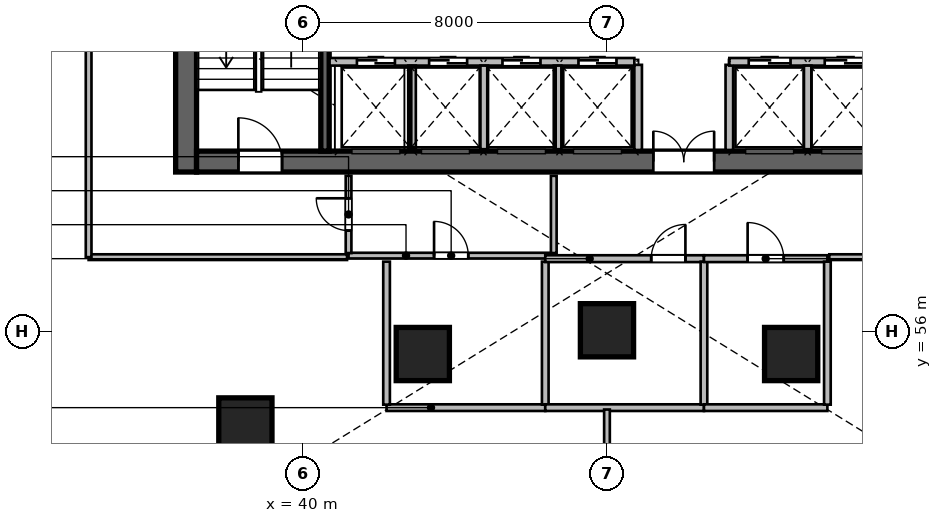
"""IFC4 building model, lengths in metres.
Left out: names, types, materials, properties, quantities, classifications, styles, units other than length and angle.
Written with IfcOpenShell. Run it as: python <this file> out.ifc"""

import sys

from ifc_helpers import new_model, si_unit, direction, frame, frame_2d, origin, origin_2d, place, context, subcontext, project, spatial, rectangle, circle, extrude, source, transform, mapped, element, fill, save


model = new_model("IFC4")
c1 = context("Model", 3, precision=1e-05, world=origin(), true_north=direction((0.0, 1.0)))
c2 = subcontext(c1, "Body", "Model", "MODEL_VIEW")
j1 = project(units=[si_unit("LENGTHUNIT", "METRE"), si_unit("PLANEANGLEUNIT", "RADIAN")], contexts=[c1])
p1 = place(None, origin())
s1 = spatial("IfcSite", under=j1, at=p1, CompositionType="ELEMENT")
p2 = place(p1, origin())
s2 = spatial("IfcBuilding", under=s1, at=p2, CompositionType="ELEMENT")
p3 = place(p2, frame((0.0, 0.0, 30.0)))
s3 = spatial("IfcBuildingStorey", under=s2, at=p3, CompositionType="ELEMENT", Elevation=30.0)
m1 = source(origin(), c2, "Body", "SweptSolid", [
    extrude(rectangle(XDim=12.0, YDim=0.55, at=frame_2d((6.0, 0.0))), origin(), (0.0, 0.0, 1.0), 5.4),
])
p4 = place(p3, frame((36.925, 60.2, 0.0), z_axis=(0.0, 0.0, 1.0), x_axis=(0.0, 1.0, 0.0)))
e1 = element("IfcWall", 1, at=p4, inside=s3, PredefinedType="SHEAR", context=c2, shape_type="MappedRepresentation", body=[
    mapped(m1, transform((0.0, 0.0, 0.0), scale=1.0)),
])
m2 = source(origin(), c2, "Body", "SweptSolid", [
    extrude(rectangle(XDim=21.6, YDim=0.55, at=frame_2d((10.8, 0.0))), origin(), (0.0, 0.0, 1.0), 5.4),
])
p5 = place(p3, frame((37.2, 60.475, 0.0), z_axis=(0.0, 0.0, 1.0), x_axis=(1.0, 0.0, 0.0)))
e2 = element("IfcWall", 2, at=p5, inside=s3, PredefinedType="SHEAR", context=c2, shape_type="MappedRepresentation", body=[
    mapped(m2, transform((0.0, 0.0, 0.0), scale=1.0)),
])
p6 = place(p5, frame((1.1, 0.0, 0.0)))
e3 = element("IfcOpeningElement", 3, at=p6, cuts=e2, PredefinedType="OPENING", context=c2, shape_type="SweptSolid", body=[
    extrude(rectangle(XDim=1.15, YDim=2.15, at=frame_2d((0.575, 1.075))), frame((0.0, 0.285, 0.0), z_axis=(0.0, -1.0, 0.0), x_axis=(1.0, 0.0, 0.0)), (0.0, 0.0, 1.0), 0.57),
])
p7 = place(p5, frame((19.5, 0.0, 0.0)))
e4 = element("IfcOpeningElement", 4, at=p7, cuts=e2, PredefinedType="OPENING", context=c2, shape_type="SweptSolid", body=[
    extrude(rectangle(XDim=0.9, YDim=2.1, at=frame_2d((0.45, 1.05))), frame((0.0, 0.285, 0.0), z_axis=(0.0, -1.0, 0.0), x_axis=(1.0, 0.0, 0.0)), (0.0, 0.0, 1.0), 0.57),
])
p8 = place(p5, frame((12.02, 0.0, 0.0)))
e5 = element("IfcOpeningElement", 5, at=p8, cuts=e2, PredefinedType="OPENING", context=c2, shape_type="SweptSolid", body=[
    extrude(rectangle(XDim=1.6, YDim=2.15, at=frame_2d((0.8, 1.075))), frame((0.0, 0.285, 0.0), z_axis=(0.0, -1.0, 0.0), x_axis=(1.0, 0.0, 0.0)), (0.0, 0.0, 1.0), 0.57),
])
m3 = source(origin(), c2, "Body", "SweptSolid", [
    extrude(rectangle(XDim=10.9, YDim=0.22, at=frame_2d((5.45, 0.0))), origin(), (0.0, 0.0, 1.0), 5.4),
])
p9 = place(p3, frame((40.58, 60.75, 0.0), z_axis=(0.0, 0.0, 1.0), x_axis=(0.0, 1.0, 0.0)))
e6 = element("IfcWall", 6, at=p9, inside=s3, PredefinedType="SHEAR", context=c2, shape_type="MappedRepresentation", body=[
    mapped(m3, transform((0.0, 0.0, 0.0), scale=1.0)),
])
m4 = source(origin(), c2, "Body", "SweptSolid", [
    extrude(circle(Radius=0.7, at=origin_2d()), origin(), (0.0, 0.0, 1.0), 5.4),
])
for number, where, z_axis, x_axis in (
    (7, (38.485, 53.558, 0.0), (0.0, 0.0, 1.0), (-0.289, 0.957, 0.0)),
    (8, (43.154, 55.411, 0.0), (0.0, 0.0, 1.0), (-0.143, 0.99, 0.0)),
    (9, (48.0, 56.036, 0.0), (0.0, 0.0, 1.0), (0.0, 1.0, 0.0)),
    (10, (52.846, 55.411, 0.0), (0.0, 0.0, 1.0), (0.143, 0.99, 0.0)),
):
    element("IfcColumn", number, at=place(p3, frame(where, z_axis=z_axis, x_axis=x_axis)), inside=s3, PredefinedType="COLUMN", context=c2, shape_type="MappedRepresentation", body=[
        mapped(m4, transform((0.0, 0.0, 0.0), scale=1.0)),
    ])
m5 = source(origin(), c2, "Body", "SweptSolid", [
    extrude(rectangle(XDim=2.24, YDim=0.2, at=frame_2d((1.12, 0.0))), origin(), (0.0, 0.0, 1.0), 5.16),
])
for number, where, z_axis, x_axis in (
    (11, (48.82, 60.78, 0.0), (0.0, 0.0, 1.0), (0.0, 1.0, 0.0)),
    (12, (51.22, 60.78, 0.0), (0.0, 0.0, 1.0), (0.0, 1.0, 0.0)),
):
    element("IfcWall", number, at=place(p3, frame(where, z_axis=z_axis, x_axis=x_axis)), inside=s3, PredefinedType="SOLIDWALL", context=c2, shape_type="MappedRepresentation", body=[
        mapped(m5, transform((0.0, 0.0, 0.0), scale=1.0)),
    ])
m6 = source(origin(), c2, "Body", "SweptSolid", [
    extrude(rectangle(XDim=8.02, YDim=0.2, at=frame_2d((4.01, 0.0))), origin(), (0.0, 0.0, 1.0), 5.16),
])
p10 = place(p3, frame((40.7, 63.1, 0.0), z_axis=(0.0, 0.0, 1.0), x_axis=(1.0, 0.0, 0.0)))
e13 = element("IfcWall", 13, at=p10, inside=s3, PredefinedType="SOLIDWALL", context=c2, shape_type="MappedRepresentation", body=[
    mapped(m6, transform((0.0, 0.0, 0.0), scale=1.0)),
])
p11 = place(p10, frame((0.72, 0.0, 0.0)))
e14 = element("IfcOpeningElement", 14, at=p11, cuts=e13, PredefinedType="OPENING", context=c2, shape_type="SweptSolid", body=[
    extrude(rectangle(XDim=1.0, YDim=2.15, at=frame_2d((0.5, 1.075))), frame((0.0, 0.11, 0.0), z_axis=(0.0, -1.0, 0.0), x_axis=(1.0, 0.0, 0.0)), (0.0, 0.0, 1.0), 0.22),
])
p12 = place(p10, frame((2.62, 0.0, 0.0)))
e15 = element("IfcOpeningElement", 15, at=p12, cuts=e13, PredefinedType="OPENING", context=c2, shape_type="SweptSolid", body=[
    extrude(rectangle(XDim=1.0, YDim=2.15, at=frame_2d((0.5, 1.075))), frame((0.0, 0.11, 0.0), z_axis=(0.0, -1.0, 0.0), x_axis=(1.0, 0.0, 0.0)), (0.0, 0.0, 1.0), 0.22),
])
p13 = place(p10, frame((4.55, 0.0, 0.0)))
e16 = element("IfcOpeningElement", 16, at=p13, cuts=e13, PredefinedType="OPENING", context=c2, shape_type="SweptSolid", body=[
    extrude(rectangle(XDim=1.0, YDim=2.15, at=frame_2d((0.5, 1.075))), frame((0.0, 0.11, 0.0), z_axis=(0.0, -1.0, 0.0), x_axis=(1.0, 0.0, 0.0)), (0.0, 0.0, 1.0), 0.22),
])
p14 = place(p10, frame((6.55, 0.0, 0.0)))
e17 = element("IfcOpeningElement", 17, at=p14, cuts=e13, PredefinedType="OPENING", context=c2, shape_type="SweptSolid", body=[
    extrude(rectangle(XDim=1.0, YDim=2.15, at=frame_2d((0.5, 1.075))), frame((0.0, 0.11, 0.0), z_axis=(0.0, -1.0, 0.0), x_axis=(1.0, 0.0, 0.0)), (0.0, 0.0, 1.0), 0.22),
])
m7 = source(origin(), c2, "Body", "SweptSolid", [
    extrude(rectangle(XDim=4.1, YDim=0.2, at=frame_2d((2.05, 0.0))), origin(), (0.0, 0.0, 1.0), 5.16),
])
p15 = place(p3, frame((51.22, 63.1, 0.0), z_axis=(0.0, 0.0, 1.0), x_axis=(1.0, 0.0, 0.0)))
e18 = element("IfcWall", 18, at=p15, inside=s3, PredefinedType="SOLIDWALL", context=c2, shape_type="MappedRepresentation", body=[
    mapped(m7, transform((0.0, 0.0, 0.0), scale=1.0)),
])
p16 = place(p15, frame((0.51, 0.0, 0.0)))
e19 = element("IfcOpeningElement", 19, at=p16, cuts=e18, PredefinedType="OPENING", context=c2, shape_type="SweptSolid", body=[
    extrude(rectangle(XDim=1.1, YDim=2.15, at=frame_2d((0.55, 1.075))), frame((0.0, 0.11, 0.0), z_axis=(0.0, -1.0, 0.0), x_axis=(1.0, 0.0, 0.0)), (0.0, 0.0, 1.0), 0.22),
])
p17 = place(p15, frame((2.51, 0.0, 0.0)))
e20 = element("IfcOpeningElement", 20, at=p17, cuts=e18, PredefinedType="OPENING", context=c2, shape_type="SweptSolid", body=[
    extrude(rectangle(XDim=1.1, YDim=2.15, at=frame_2d((0.55, 1.075))), frame((0.0, 0.11, 0.0), z_axis=(0.0, -1.0, 0.0), x_axis=(1.0, 0.0, 0.0)), (0.0, 0.0, 1.0), 0.22),
])
m8 = source(origin(), c2, "Body", "SweptSolid", [
    extrude(rectangle(XDim=2.2, YDim=0.2, at=frame_2d((1.1, 0.0))), origin(), (0.0, 0.0, 1.0), 5.16),
])
for number, where, z_axis, x_axis in (
    (21, (42.87, 60.8, 0.0), (0.0, 0.0, 1.0), (0.0, 1.0, 0.0)),
    (22, (44.77, 60.8, 0.0), (0.0, 0.0, 1.0), (0.0, 1.0, 0.0)),
    (23, (46.7, 60.8, 0.0), (0.0, 0.0, 1.0), (0.0, 1.0, 0.0)),
    (24, (53.28, 60.8, 0.0), (0.0, 0.0, 1.0), (0.0, 1.0, 0.0)),
):
    element("IfcWall", number, at=place(p3, frame(where, z_axis=z_axis, x_axis=x_axis)), inside=s3, PredefinedType="SOLIDWALL", context=c2, shape_type="MappedRepresentation", body=[
        mapped(m8, transform((0.0, 0.0, 0.0), scale=1.0)),
    ])
m9 = source(origin(), c2, "Body", "SweptSolid", [
    extrude(rectangle(XDim=5.4, YDim=0.15, at=frame_2d((2.7, 0.0))), origin(), (0.0, 0.0, 1.0), 4.591),
])
p18 = place(p3, frame((41.2, 58.0, 0.0), z_axis=(0.0, 0.0, 1.0), x_axis=(1.0, 0.0, 0.0)))
e25 = element("IfcWall", 25, at=p18, inside=s3, PredefinedType="PARTITIONING", context=c2, shape_type="MappedRepresentation", body=[
    mapped(m9, transform((0.0, 0.0, 0.0), scale=1.0)),
])
p19 = place(p18, frame((2.25, 0.0, 0.0)))
e26 = element("IfcOpeningElement", 26, at=p19, cuts=e25, PredefinedType="OPENING", context=c2, shape_type="SweptSolid", body=[
    extrude(rectangle(XDim=0.9, YDim=2.08, at=frame_2d((0.45, 1.04))), frame((0.0, 0.085, 0.0), z_axis=(0.0, -1.0, 0.0), x_axis=(1.0, 0.0, 0.0)), (0.0, 0.0, 1.0), 0.17),
])
m10 = source(origin(), c2, "Body", "SweptSolid", [
    extrude(rectangle(XDim=2.033, YDim=0.15, at=frame_2d((1.016, 0.0))), origin(), (0.0, 0.0, 1.0), 5.16),
])
p20 = place(p3, frame((41.2, 58.067, 0.0), z_axis=(0.0, 0.0, 1.0), x_axis=(0.0, 1.0, 0.0)))
e27 = element("IfcWall", 27, at=p20, inside=s3, PredefinedType="PARTITIONING", context=c2, shape_type="MappedRepresentation", body=[
    mapped(m10, transform((0.0, 0.0, 0.0), scale=1.0)),
])
p21 = place(p20, frame((0.591, 0.0, 0.0)))
e28 = element("IfcOpeningElement", 28, at=p21, cuts=e27, PredefinedType="OPENING", context=c2, shape_type="SweptSolid", body=[
    extrude(rectangle(XDim=0.85, YDim=2.1, at=frame_2d((0.425, 1.05))), frame((0.0, 0.085, 0.0), z_axis=(0.0, -1.0, 0.0), x_axis=(1.0, 0.0, 0.0)), (0.0, 0.0, 1.0), 0.17),
])
p22 = place(p3, frame((46.6, 58.067, 0.0), z_axis=(0.0, 0.0, 1.0), x_axis=(0.0, 1.0, 0.0)))
e29 = element("IfcWall", 29, at=p22, inside=s3, PredefinedType="PARTITIONING", context=c2, shape_type="MappedRepresentation", body=[
    mapped(m10, transform((0.0, 0.0, 0.0), scale=1.0)),
])
m11 = source(origin(), c2, "Body", "SweptSolid", [
    extrude(rectangle(XDim=4.176, YDim=0.175, at=frame_2d((2.088, 0.0))), origin(), (0.0, 0.0, 1.0), 5.16),
])
p23 = place(p3, frame((42.2, 54.0, 0.0), z_axis=(0.0, 0.0, 1.0), x_axis=(1.0, 0.0, 0.0)))
e30 = element("IfcWall", 30, at=p23, inside=s3, PredefinedType="PARTITIONING", context=c2, shape_type="MappedRepresentation", body=[
    mapped(m11, transform((0.0, 0.0, 0.0), scale=1.0)),
])
m12 = source(origin(), c2, "Body", "SweptSolid", [
    extrude(rectangle(XDim=3.763, YDim=0.175, at=frame_2d((1.881, 0.0))), origin(), (0.0, 0.0, 1.0), 5.16),
])
for number, where, z_axis, x_axis in (
    (31, (42.2, 54.079, 0.0), (0.0, 0.0, 1.0), (0.0, 1.0, 0.0)),
    (32, (46.376, 54.079, 0.0), (0.0, 0.0, 1.0), (0.0, 1.0, 0.0)),
):
    element("IfcWall", number, at=place(p3, frame(where, z_axis=z_axis, x_axis=x_axis)), inside=s3, PredefinedType="PARTITIONING", context=c2, shape_type="MappedRepresentation", body=[
        mapped(m12, transform((0.0, 0.0, 0.0), scale=1.0)),
    ])
p24 = place(p3, frame((46.376, 54.0, 0.0), z_axis=(0.0, 0.0, 1.0), x_axis=(1.0, 0.0, 0.0)))
e33 = element("IfcWall", 33, at=p24, inside=s3, PredefinedType="PARTITIONING", context=c2, shape_type="MappedRepresentation", body=[
    mapped(m11, transform((0.0, 0.0, 0.0), scale=1.0)),
])
m13 = source(origin(), c2, "Body", "SweptSolid", [
    extrude(rectangle(XDim=4.176, YDim=0.18, at=frame_2d((2.088, 0.0))), origin(), (0.0, 0.0, 1.0), 5.16),
])
p25 = place(p3, frame((46.376, 57.92, 0.0), z_axis=(0.0, 0.0, 1.0), x_axis=(1.0, 0.0, 0.0)))
e34 = element("IfcWall", 34, at=p25, inside=s3, PredefinedType="PLUMBINGWALL", context=c2, shape_type="MappedRepresentation", body=[
    mapped(m13, transform((0.0, 0.0, 0.0), scale=1.0)),
])
p26 = place(p25, frame((2.788, 0.0, 0.0)))
e35 = element("IfcOpeningElement", 35, at=p26, cuts=e34, PredefinedType="OPENING", context=c2, shape_type="SweptSolid", body=[
    extrude(rectangle(XDim=0.9, YDim=2.08, at=frame_2d((0.45, 1.04))), frame((0.0, 0.1, 0.0), z_axis=(0.0, -1.0, 0.0), x_axis=(1.0, 0.0, 0.0)), (0.0, 0.0, 1.0), 0.2),
])
p27 = place(p3, frame((50.552, 54.079, 0.0), z_axis=(0.0, 0.0, 1.0), x_axis=(0.0, 1.0, 0.0)))
e36 = element("IfcWall", 36, at=p27, inside=s3, PredefinedType="PARTITIONING", context=c2, shape_type="MappedRepresentation", body=[
    mapped(m12, transform((0.0, 0.0, 0.0), scale=1.0)),
])
m14 = source(origin(), c2, "Body", "SweptSolid", [
    extrude(rectangle(XDim=3.248, YDim=0.175, at=frame_2d((1.624, 0.0))), origin(), (0.0, 0.0, 1.0), 5.16),
])
p28 = place(p3, frame((50.552, 54.0, 0.0), z_axis=(0.0, 0.0, 1.0), x_axis=(1.0, 0.0, 0.0)))
e37 = element("IfcWall", 37, at=p28, inside=s3, PredefinedType="PARTITIONING", context=c2, shape_type="MappedRepresentation", body=[
    mapped(m14, transform((0.0, 0.0, 0.0), scale=1.0)),
])
m15 = source(origin(), c2, "Body", "SweptSolid", [
    extrude(rectangle(XDim=3.248, YDim=0.18, at=frame_2d((1.624, 0.0))), origin(), (0.0, 0.0, 1.0), 5.16),
])
p29 = place(p3, frame((50.552, 57.92, 0.0), z_axis=(0.0, 0.0, 1.0), x_axis=(1.0, 0.0, 0.0)))
e38 = element("IfcWall", 38, at=p29, inside=s3, PredefinedType="PLUMBINGWALL", context=c2, shape_type="MappedRepresentation", body=[
    mapped(m15, transform((0.0, 0.0, 0.0), scale=1.0)),
])
p30 = place(p29, frame((1.149, 0.0, 0.0)))
e39 = element("IfcOpeningElement", 39, at=p30, cuts=e38, PredefinedType="OPENING", context=c2, shape_type="SweptSolid", body=[
    extrude(rectangle(XDim=0.95, YDim=2.12, at=frame_2d((0.475, 1.06))), frame((0.0, 0.1, 0.0), z_axis=(0.0, -1.0, 0.0), x_axis=(1.0, 0.0, 0.0)), (0.0, 0.0, 1.0), 0.2),
])
p31 = place(p3, frame((53.8, 54.079, 0.0), z_axis=(0.0, 0.0, 1.0), x_axis=(0.0, 1.0, 0.0)))
e40 = element("IfcWall", 40, at=p31, inside=s3, PredefinedType="PARTITIONING", context=c2, shape_type="MappedRepresentation", body=[
    mapped(m12, transform((0.0, 0.0, 0.0), scale=1.0)),
])
m16 = source(origin(), c2, "Body", "SweptSolid", [
    extrude(rectangle(XDim=2.146, YDim=0.15, at=frame_2d((1.073, 0.0))), origin(), (0.0, 0.0, 1.0), 5.16),
])
p32 = place(p3, frame((48.0, 51.804, 0.0), z_axis=(0.0, 0.0, 1.0), x_axis=(0.0, 1.0, 0.0)))
e41 = element("IfcWall", 41, at=p32, inside=s3, PredefinedType="PARTITIONING", context=c2, shape_type="MappedRepresentation", body=[
    mapped(m16, transform((0.0, 0.0, 0.0), scale=1.0)),
])
m17 = source(origin(), c2, "Body", "SweptSolid", [
    extrude(rectangle(XDim=6.8, YDim=0.15, at=frame_2d((3.4, 0.0))), origin(), (0.0, 0.0, 1.0), 5.16),
])
p33 = place(p3, frame((34.36, 57.96, 0.0), z_axis=(0.0, 0.0, 1.0), x_axis=(1.0, 0.0, 0.0)))
e42 = element("IfcWall", 42, at=p33, inside=s3, PredefinedType="PARTITIONING", context=c2, shape_type="MappedRepresentation", body=[
    mapped(m17, transform((0.0, 0.0, 0.0), scale=1.0)),
])
m18 = source(origin(), c2, "Body", "SweptSolid", [
    extrude(rectangle(XDim=19.708, YDim=0.15, at=frame_2d((9.854, 0.0))), origin(), (0.0, 0.0, 1.0), 5.16),
])
p34 = place(p3, frame((34.36, 57.96, 0.0), z_axis=(0.0, 0.0, 1.0), x_axis=(0.0, 1.0, 0.0)))
e43 = element("IfcWall", 43, at=p34, inside=s3, PredefinedType="PARTITIONING", context=c2, shape_type="MappedRepresentation", body=[
    mapped(m18, transform((0.0, 0.0, 0.0), scale=1.0)),
])
p35 = place(p34, frame((9.154, 0.0, 0.0)))
e44 = element("IfcOpeningElement", 44, at=p35, cuts=e43, PredefinedType="OPENING", context=c2, shape_type="SweptSolid", body=[
    extrude(rectangle(XDim=1.4, YDim=2.15, at=frame_2d((0.7, 1.075))), frame((0.0, 0.085, 0.0), z_axis=(0.0, -1.0, 0.0), x_axis=(1.0, 0.0, 0.0)), (0.0, 0.0, 1.0), 0.17),
])
m19 = source(origin(), c2, "Body", "SweptSolid", [
    extrude(rectangle(XDim=7.79, YDim=0.15, at=frame_2d((3.895, 0.0))), origin(), (0.0, 0.0, 1.0), 4.591),
])
p36 = place(p3, frame((53.85, 57.96, 0.0), z_axis=(0.0, 0.0, 1.0), x_axis=(1.0, 0.0, 0.0)))
e45 = element("IfcWall", 45, at=p36, inside=s3, PredefinedType="PARTITIONING", context=c2, shape_type="MappedRepresentation", body=[
    mapped(m19, transform((0.0, 0.0, 0.0), scale=1.0)),
])
p37 = place(p36, frame((3.195, 0.0, 0.0)))
e46 = element("IfcOpeningElement", 46, at=p37, cuts=e45, PredefinedType="OPENING", context=c2, shape_type="SweptSolid", body=[
    extrude(rectangle(XDim=1.4, YDim=2.15, at=frame_2d((0.7, 1.075))), frame((0.0, 0.085, 0.0), z_axis=(0.0, -1.0, 0.0), x_axis=(1.0, 0.0, 0.0)), (0.0, 0.0, 1.0), 0.17),
])
m20 = source(origin(), c2, "Body", "SweptSolid", [
    extrude(rectangle(XDim=1.15, YDim=2.15, at=frame_2d((0.575, 1.075))), frame((0.0, 0.025, 0.0), z_axis=(0.0, -1.0, 0.0), x_axis=(1.0, 0.0, 0.0)), (0.0, 0.0, 1.0), 0.05),
])
p38 = place(p6, origin())
e47 = element("IfcDoor", 47, at=p38, inside=s3, OperationType="SINGLE_SWING_LEFT", PredefinedType="DOOR", context=c2, shape_type="MappedRepresentation", body=[
    mapped(m20, transform((0.0, 0.0, 0.0), scale=1.0)),
])
fill(e3, e47)
m21 = source(origin(), c2, "Body", "SweptSolid", [
    extrude(rectangle(XDim=1.6, YDim=2.15, at=frame_2d((0.8, 1.075))), frame((0.0, 0.025, 0.0), z_axis=(0.0, -1.0, 0.0), x_axis=(1.0, 0.0, 0.0)), (0.0, 0.0, 1.0), 0.05),
])
p39 = place(p8, origin())
e48 = element("IfcDoor", 48, at=p39, inside=s3, OperationType="DOUBLE_DOOR_SINGLE_SWING", PredefinedType="DOOR", context=c2, shape_type="MappedRepresentation", body=[
    mapped(m21, transform((0.0, 0.0, 0.0), scale=1.0)),
])
fill(e5, e48)
m22 = source(origin(), c2, "Body", "SweptSolid", [
    extrude(rectangle(XDim=1.0, YDim=2.15, at=frame_2d((0.5, 1.075))), frame((0.0, 0.025, 0.0), z_axis=(0.0, -1.0, 0.0), x_axis=(1.0, 0.0, 0.0)), (0.0, 0.0, 1.0), 0.05),
])
p40 = place(p11, origin())
e49 = element("IfcDoor", 49, at=p40, inside=s3, OperationType="DOUBLE_DOOR_SLIDING", PredefinedType="DOOR", context=c2, shape_type="MappedRepresentation", body=[
    mapped(m22, transform((0.0, 0.0, 0.0), scale=1.0)),
])
fill(e14, e49)
p41 = place(p12, origin())
e50 = element("IfcDoor", 50, at=p41, inside=s3, OperationType="DOUBLE_DOOR_SLIDING", PredefinedType="DOOR", context=c2, shape_type="MappedRepresentation", body=[
    mapped(m22, transform((0.0, 0.0, 0.0), scale=1.0)),
])
fill(e15, e50)
p42 = place(p13, origin())
e51 = element("IfcDoor", 51, at=p42, inside=s3, OperationType="DOUBLE_DOOR_SLIDING", PredefinedType="DOOR", context=c2, shape_type="MappedRepresentation", body=[
    mapped(m22, transform((0.0, 0.0, 0.0), scale=1.0)),
])
fill(e16, e51)
p43 = place(p14, origin())
e52 = element("IfcDoor", 52, at=p43, inside=s3, OperationType="DOUBLE_DOOR_SLIDING", PredefinedType="DOOR", context=c2, shape_type="MappedRepresentation", body=[
    mapped(m22, transform((0.0, 0.0, 0.0), scale=1.0)),
])
fill(e17, e52)
m23 = source(origin(), c2, "Body", "SweptSolid", [
    extrude(rectangle(XDim=1.1, YDim=2.15, at=frame_2d((0.55, 1.075))), frame((0.0, 0.025, 0.0), z_axis=(0.0, -1.0, 0.0), x_axis=(1.0, 0.0, 0.0)), (0.0, 0.0, 1.0), 0.05),
])
p44 = place(p16, origin())
e53 = element("IfcDoor", 53, at=p44, inside=s3, OperationType="DOUBLE_DOOR_SLIDING", PredefinedType="DOOR", context=c2, shape_type="MappedRepresentation", body=[
    mapped(m23, transform((0.0, 0.0, 0.0), scale=1.0)),
])
fill(e19, e53)
p45 = place(p17, origin())
e54 = element("IfcDoor", 54, at=p45, inside=s3, OperationType="DOUBLE_DOOR_SLIDING", PredefinedType="DOOR", context=c2, shape_type="MappedRepresentation", body=[
    mapped(m23, transform((0.0, 0.0, 0.0), scale=1.0)),
])
fill(e20, e54)
m24 = source(origin(), c2, "Body", "SweptSolid", [
    extrude(rectangle(XDim=0.85, YDim=2.1, at=frame_2d((0.425, 1.05))), frame((0.0, 0.025, 0.0), z_axis=(0.0, -1.0, 0.0), x_axis=(1.0, 0.0, 0.0)), (0.0, 0.0, 1.0), 0.05),
])
p46 = place(p21, origin())
e55 = element("IfcDoor", 55, at=p46, inside=s3, OperationType="SINGLE_SWING_RIGHT", PredefinedType="DOOR", context=c2, shape_type="MappedRepresentation", body=[
    mapped(m24, transform((0.0, 0.0, 0.0), scale=1.0)),
])
fill(e28, e55)
m25 = source(origin(), c2, "Body", "SweptSolid", [
    extrude(rectangle(XDim=0.9, YDim=2.08, at=frame_2d((0.45, 1.04))), frame((0.0, 0.025, 0.0), z_axis=(0.0, -1.0, 0.0), x_axis=(1.0, 0.0, 0.0)), (0.0, 0.0, 1.0), 0.05),
])
p47 = place(p19, origin())
e56 = element("IfcDoor", 56, at=p47, inside=s3, OperationType="SINGLE_SWING_LEFT", PredefinedType="DOOR", context=c2, shape_type="MappedRepresentation", body=[
    mapped(m25, transform((0.0, 0.0, 0.0), scale=1.0)),
])
fill(e26, e56)
p48 = place(p26, origin())
e57 = element("IfcDoor", 57, at=p48, inside=s3, OperationType="SINGLE_SWING_RIGHT", PredefinedType="DOOR", context=c2, shape_type="MappedRepresentation", body=[
    mapped(m25, transform((0.0, 0.0, 0.0), scale=1.0)),
])
fill(e35, e57)
m26 = source(origin(), c2, "Body", "SweptSolid", [
    extrude(rectangle(XDim=0.95, YDim=2.12, at=frame_2d((0.475, 1.06))), frame((0.0, 0.025, 0.0), z_axis=(0.0, -1.0, 0.0), x_axis=(1.0, 0.0, 0.0)), (0.0, 0.0, 1.0), 0.05),
])
p49 = place(p30, origin())
e58 = element("IfcDoor", 58, at=p49, inside=s3, OperationType="SINGLE_SWING_LEFT", PredefinedType="DOOR", context=c2, shape_type="MappedRepresentation", body=[
    mapped(m26, transform((0.0, 0.0, 0.0), scale=1.0)),
])
fill(e39, e58)
save(model, sys.argv[1])
